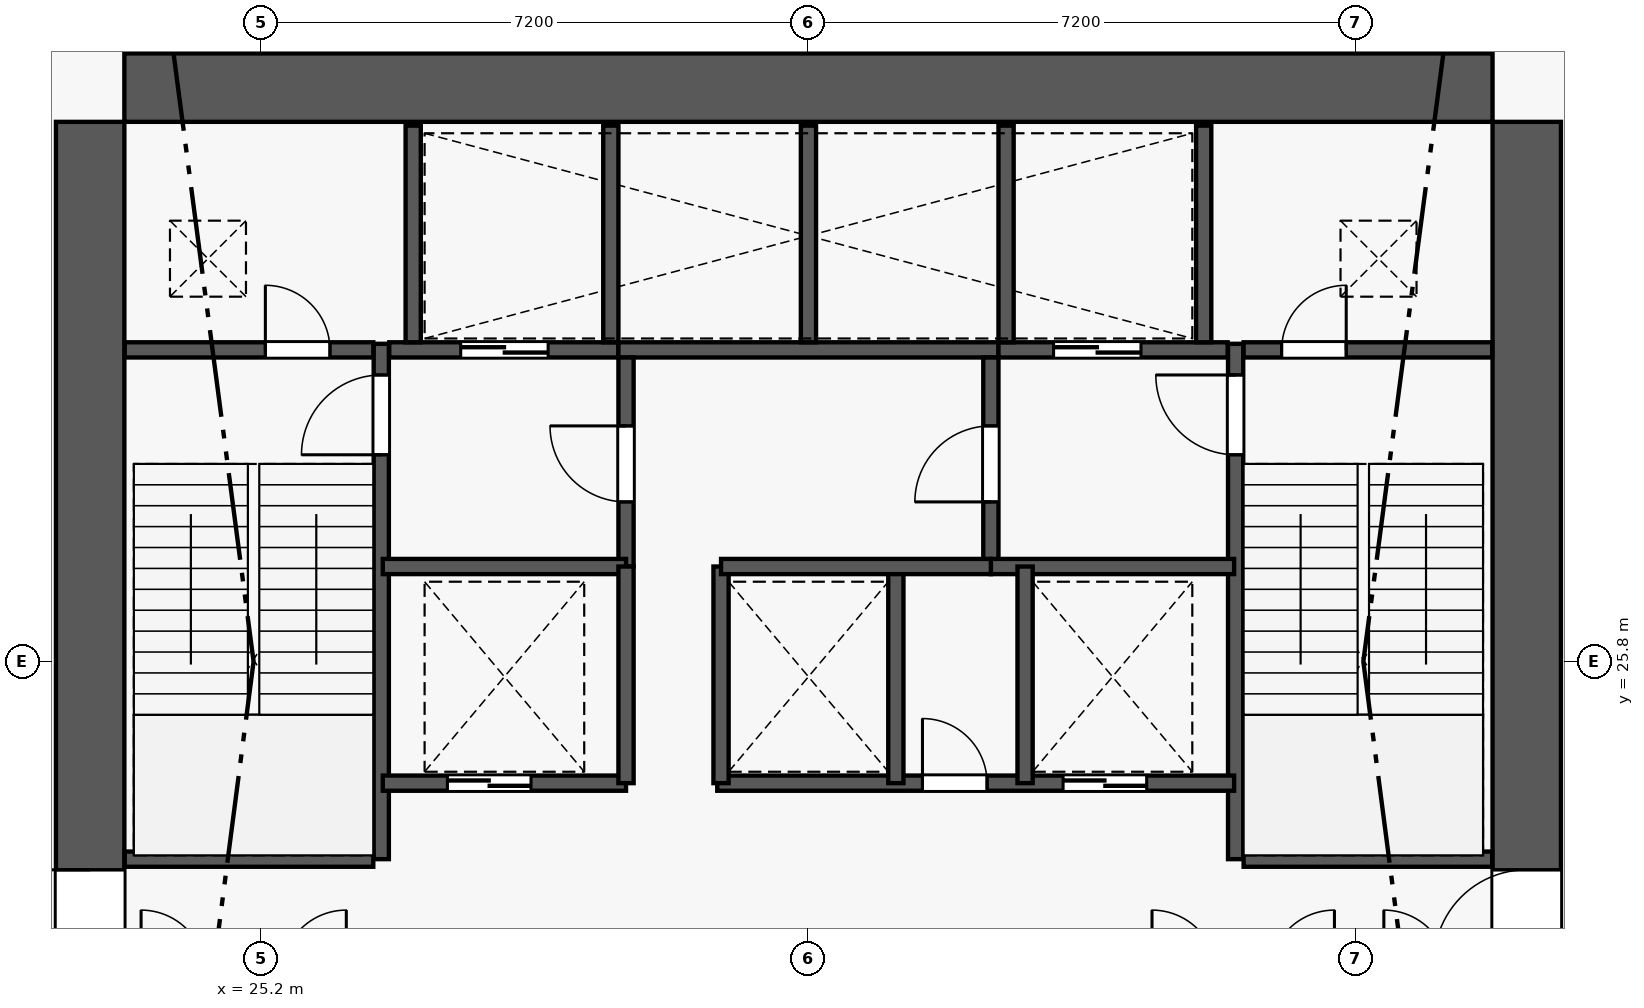
"""IFC4 building model, lengths in metres.
Left out: names, types, materials, properties, quantities, classifications, styles, units other than length and angle.
Written with IfcOpenShell. Run it as: python <this file> out.ifc"""

import sys

from ifc_helpers import new_model, si_unit, direction, frame, frame_2d, origin, origin_2d, place, context, subcontext, project, spatial, rectangle, extrude, element, fill, save


model = new_model("IFC4")
c1 = context("Model", 3, precision=1e-05, world=origin(), true_north=direction((0.0, 1.0)))
c2 = subcontext(c1, "Body", "Model", "MODEL_VIEW")
j1 = project(units=[si_unit("LENGTHUNIT", "METRE"), si_unit("PLANEANGLEUNIT", "RADIAN")], contexts=[c1])
p1 = place(None, origin())
s1 = spatial("IfcSite", under=j1, at=p1, CompositionType="ELEMENT")
p2 = place(p1, origin())
s2 = spatial("IfcBuilding", under=s1, at=p2, CompositionType="ELEMENT")
p3 = place(p2, frame((0.0, 0.0, 10.5)))
s3 = spatial("IfcBuildingStorey", under=s2, at=p3, CompositionType="ELEMENT", Elevation=10.5)
for number, where, z_axis, x_axis in (
    (1, (41.85, 33.35, 0.0), (0.0, 0.0, 1.0), (1.0, 0.0, 0.0)),
    (2, (22.95, 33.35, 0.0), (0.0, 0.0, 1.0), (1.0, 0.0, 0.0)),
):
    element("IfcColumn", number, at=place(p3, frame(where, z_axis=z_axis, x_axis=x_axis)), inside=s3, PredefinedType="COLUMN", context=c2, shape_type="SweptSolid", body=[
        extrude(rectangle(XDim=0.9, YDim=0.9, at=origin_2d()), origin(), (0.0, 0.0, 1.0), 4.5),
    ])
p4 = place(p3, frame((23.4, 33.35, 0.0), z_axis=(0.0, 0.0, 1.0), x_axis=(1.0, 0.0, 0.0)))
e3 = element("IfcWall", 3, at=p4, inside=s3, PredefinedType="SHEAR", context=c2, shape_type="SweptSolid", body=[
    extrude(rectangle(XDim=18.0, YDim=0.9, at=frame_2d((9.0, 0.0))), origin(), (0.0, 0.0, 1.0), 4.25),
])
p5 = place(p3, frame((22.95, 18.9, 0.0), z_axis=(0.0, 0.0, 1.0), x_axis=(0.0, 1.0, 0.0)))
e4 = element("IfcWall", 4, at=p5, inside=s3, PredefinedType="SHEAR", context=c2, shape_type="SweptSolid", body=[
    extrude(rectangle(XDim=14.0, YDim=0.9, at=frame_2d((7.0, 0.0))), origin(), (0.0, 0.0, 1.0), 4.25),
])
p6 = place(p5, frame((2.94, 0.0, 0.0)))
e5 = element("IfcOpeningElement", 5, at=p6, cuts=e4, PredefinedType="OPENING", context=c2, shape_type="SweptSolid", body=[
    extrude(rectangle(XDim=1.22, YDim=2.25, at=frame_2d((0.61, 1.125))), frame((0.0, 0.46, 0.0), z_axis=(0.0, -1.0, 0.0), x_axis=(1.0, 0.0, 0.0)), (0.0, 0.0, 1.0), 0.92),
])
p7 = place(p3, frame((41.85, 18.9, 0.0), z_axis=(0.0, 0.0, 1.0), x_axis=(0.0, 1.0, 0.0)))
e6 = element("IfcWall", 6, at=p7, inside=s3, PredefinedType="SHEAR", context=c2, shape_type="SweptSolid", body=[
    extrude(rectangle(XDim=14.0, YDim=0.9, at=frame_2d((7.0, 0.0))), origin(), (0.0, 0.0, 1.0), 4.25),
])
p8 = place(p7, frame((2.94, 0.0, 0.0)))
e7 = element("IfcOpeningElement", 7, at=p8, cuts=e6, PredefinedType="OPENING", context=c2, shape_type="SweptSolid", body=[
    extrude(rectangle(XDim=1.22, YDim=2.25, at=frame_2d((0.61, 1.125))), frame((0.0, 0.46, 0.0), z_axis=(0.0, -1.0, 0.0), x_axis=(1.0, 0.0, 0.0)), (0.0, 0.0, 1.0), 0.92),
])
p9 = place(p3, frame((26.78, 23.2, 0.0), z_axis=(0.0, 0.0, 1.0), x_axis=(0.0, 1.0, 0.0)))
e8 = element("IfcWall", 8, at=p9, inside=s3, PredefinedType="SHEAR", context=c2, shape_type="SweptSolid", body=[
    extrude(rectangle(XDim=6.78, YDim=0.2, at=frame_2d((3.39, 0.0))), origin(), (0.0, 0.0, 1.0), 4.5),
])
p10 = place(p9, frame((5.32, 0.0, 0.0)))
e9 = element("IfcOpeningElement", 9, at=p10, cuts=e8, PredefinedType="OPENING", context=c2, shape_type="SweptSolid", body=[
    extrude(rectangle(XDim=1.05, YDim=2.15, at=frame_2d((0.525, 1.075))), frame((0.0, 0.11, 0.0), z_axis=(0.0, -1.0, 0.0), x_axis=(1.0, 0.0, 0.0)), (0.0, 0.0, 1.0), 0.22),
])
p11 = place(p3, frame((23.405, 23.2, 0.0), z_axis=(0.0, 0.0, 1.0), x_axis=(1.0, 0.0, 0.0)))
e10 = element("IfcWall", 10, at=p11, inside=s3, PredefinedType="PLUMBINGWALL", context=c2, shape_type="SweptSolid", body=[
    extrude(rectangle(XDim=3.27, YDim=0.2, at=frame_2d((1.635, 0.0))), origin(), (0.0, 0.0, 1.0), 4.25),
])
p12 = place(p3, frame((38.02, 23.2, 0.0), z_axis=(0.0, 0.0, 1.0), x_axis=(0.0, 1.0, 0.0)))
e11 = element("IfcWall", 11, at=p12, inside=s3, PredefinedType="SHEAR", context=c2, shape_type="SweptSolid", body=[
    extrude(rectangle(XDim=6.78, YDim=0.2, at=frame_2d((3.39, 0.0))), origin(), (0.0, 0.0, 1.0), 4.5),
])
p13 = place(p12, frame((5.32, 0.0, 0.0)))
e12 = element("IfcOpeningElement", 12, at=p13, cuts=e11, PredefinedType="OPENING", context=c2, shape_type="SweptSolid", body=[
    extrude(rectangle(XDim=1.05, YDim=2.15, at=frame_2d((0.525, 1.075))), frame((0.0, 0.11, 0.0), z_axis=(0.0, -1.0, 0.0), x_axis=(1.0, 0.0, 0.0)), (0.0, 0.0, 1.0), 0.22),
])
p14 = place(p3, frame((38.125, 23.2, 0.0), z_axis=(0.0, 0.0, 1.0), x_axis=(1.0, 0.0, 0.0)))
e13 = element("IfcWall", 13, at=p14, inside=s3, PredefinedType="PLUMBINGWALL", context=c2, shape_type="SweptSolid", body=[
    extrude(rectangle(XDim=3.27, YDim=0.2, at=frame_2d((1.635, 0.0))), origin(), (0.0, 0.0, 1.0), 4.25),
])
p15 = place(p3, frame((23.405, 29.9, 0.0), z_axis=(0.0, 0.0, 1.0), x_axis=(1.0, 0.0, 0.0)))
e14 = element("IfcWall", 14, at=p15, inside=s3, PredefinedType="PLUMBINGWALL", context=c2, shape_type="SweptSolid", body=[
    extrude(rectangle(XDim=3.27, YDim=0.2, at=frame_2d((1.635, 0.0))), origin(), (0.0, 0.0, 1.0), 4.25),
])
p16 = place(p15, frame((1.85, 0.0, 0.0)))
e15 = element("IfcOpeningElement", 15, at=p16, cuts=e14, PredefinedType="OPENING", context=c2, shape_type="SweptSolid", body=[
    extrude(rectangle(XDim=0.85, YDim=2.05, at=frame_2d((0.425, 1.025))), frame((0.0, 0.11, 0.0), z_axis=(0.0, -1.0, 0.0), x_axis=(1.0, 0.0, 0.0)), (0.0, 0.0, 1.0), 0.22),
])
p17 = place(p3, frame((26.885, 29.9, 0.0), z_axis=(0.0, 0.0, 1.0), x_axis=(1.0, 0.0, 0.0)))
e16 = element("IfcWall", 16, at=p17, inside=s3, PredefinedType="PLUMBINGWALL", context=c2, shape_type="SweptSolid", body=[
    extrude(rectangle(XDim=3.015, YDim=0.2, at=frame_2d((1.507, 0.0))), origin(), (0.0, 0.0, 1.0), 4.25),
])
p18 = place(p17, frame((0.94, 0.0, 0.0)))
e17 = element("IfcOpeningElement", 17, at=p18, cuts=e16, PredefinedType="OPENING", context=c2, shape_type="SweptSolid", body=[
    extrude(rectangle(XDim=1.15, YDim=2.2, at=frame_2d((0.575, 1.1))), frame((0.0, 0.11, 0.0), z_axis=(0.0, -1.0, 0.0), x_axis=(1.0, 0.0, 0.0)), (0.0, 0.0, 1.0), 0.22),
])
p19 = place(p3, frame((29.9, 29.9, 0.0), z_axis=(0.0, 0.0, 1.0), x_axis=(1.0, 0.0, 0.0)))
e18 = element("IfcWall", 18, at=p19, inside=s3, PredefinedType="PLUMBINGWALL", context=c2, shape_type="SweptSolid", body=[
    extrude(rectangle(XDim=5.0, YDim=0.2, at=frame_2d((2.5, 0.0))), origin(), (0.0, 0.0, 1.0), 4.25),
])
p20 = place(p3, frame((34.9, 29.9, 0.0), z_axis=(0.0, 0.0, 1.0), x_axis=(1.0, 0.0, 0.0)))
e19 = element("IfcWall", 19, at=p20, inside=s3, PredefinedType="PLUMBINGWALL", context=c2, shape_type="SweptSolid", body=[
    extrude(rectangle(XDim=3.015, YDim=0.2, at=frame_2d((1.508, 0.0))), origin(), (0.0, 0.0, 1.0), 4.25),
])
p21 = place(p20, frame((0.725, 0.0, 0.0)))
e20 = element("IfcOpeningElement", 20, at=p21, cuts=e19, PredefinedType="OPENING", context=c2, shape_type="SweptSolid", body=[
    extrude(rectangle(XDim=1.15, YDim=2.2, at=frame_2d((0.575, 1.1))), frame((0.0, 0.11, 0.0), z_axis=(0.0, -1.0, 0.0), x_axis=(1.0, 0.0, 0.0)), (0.0, 0.0, 1.0), 0.22),
])
p22 = place(p3, frame((38.125, 29.9, 0.0), z_axis=(0.0, 0.0, 1.0), x_axis=(1.0, 0.0, 0.0)))
e21 = element("IfcWall", 21, at=p22, inside=s3, PredefinedType="PLUMBINGWALL", context=c2, shape_type="SweptSolid", body=[
    extrude(rectangle(XDim=3.27, YDim=0.2, at=frame_2d((1.635, 0.0))), origin(), (0.0, 0.0, 1.0), 4.25),
])
p23 = place(p22, frame((0.5, 0.0, 0.0)))
e22 = element("IfcOpeningElement", 22, at=p23, cuts=e21, PredefinedType="OPENING", context=c2, shape_type="SweptSolid", body=[
    extrude(rectangle(XDim=0.85, YDim=2.05, at=frame_2d((0.425, 1.025))), frame((0.0, 0.11, 0.0), z_axis=(0.0, -1.0, 0.0), x_axis=(1.0, 0.0, 0.0)), (0.0, 0.0, 1.0), 0.22),
])
for number, where, z_axis, x_axis in (
    (23, (27.2, 30.0, 0.0), (0.0, 0.0, 1.0), (0.0, 1.0, 0.0)),
    (24, (29.8, 30.0, 0.0), (0.0, 0.0, 1.0), (0.0, 1.0, 0.0)),
    (25, (32.4, 30.0, 0.0), (0.0, 0.0, 1.0), (0.0, 1.0, 0.0)),
    (26, (35.0, 30.0, 0.0), (0.0, 0.0, 1.0), (0.0, 1.0, 0.0)),
    (27, (37.6, 30.0, 0.0), (0.0, 0.0, 1.0), (0.0, 1.0, 0.0)),
):
    element("IfcWall", number, at=place(p3, frame(where, z_axis=z_axis, x_axis=x_axis)), inside=s3, PredefinedType="PLUMBINGWALL", context=c2, shape_type="SweptSolid", body=[
        extrude(rectangle(XDim=2.85, YDim=0.2, at=frame_2d((1.425, 0.0))), origin(), (0.0, 0.0, 1.0), 4.25),
    ])
p24 = place(p3, frame((30.0, 27.05, 0.0), z_axis=(0.0, 0.0, 1.0), x_axis=(0.0, 1.0, 0.0)))
e28 = element("IfcWall", 28, at=p24, inside=s3, PredefinedType="PLUMBINGWALL", context=c2, shape_type="SweptSolid", body=[
    extrude(rectangle(XDim=2.75, YDim=0.2, at=frame_2d((1.375, 0.0))), origin(), (0.0, 0.0, 1.0), 4.25),
])
p25 = place(p24, frame((0.85, 0.0, 0.0)))
e29 = element("IfcOpeningElement", 29, at=p25, cuts=e28, PredefinedType="OPENING", context=c2, shape_type="SweptSolid", body=[
    extrude(rectangle(XDim=1.0, YDim=2.15, at=frame_2d((0.5, 1.075))), frame((0.0, 0.11, 0.0), z_axis=(0.0, -1.0, 0.0), x_axis=(1.0, 0.0, 0.0)), (0.0, 0.0, 1.0), 0.22),
])
p26 = place(p3, frame((26.8, 27.05, 0.0), z_axis=(0.0, 0.0, 1.0), x_axis=(1.0, 0.0, 0.0)))
e30 = element("IfcWall", 30, at=p26, inside=s3, PredefinedType="PLUMBINGWALL", context=c2, shape_type="SweptSolid", body=[
    extrude(rectangle(XDim=3.2, YDim=0.2, at=frame_2d((1.6, 0.0))), origin(), (0.0, 0.0, 1.0), 4.25),
])
p27 = place(p3, frame((34.8, 27.05, 0.0), z_axis=(0.0, 0.0, 1.0), x_axis=(0.0, 1.0, 0.0)))
e31 = element("IfcWall", 31, at=p27, inside=s3, PredefinedType="PLUMBINGWALL", context=c2, shape_type="SweptSolid", body=[
    extrude(rectangle(XDim=2.75, YDim=0.2, at=frame_2d((1.375, 0.0))), origin(), (0.0, 0.0, 1.0), 4.25),
])
p28 = place(p27, frame((0.85, 0.0, 0.0)))
e32 = element("IfcOpeningElement", 32, at=p28, cuts=e31, PredefinedType="OPENING", context=c2, shape_type="SweptSolid", body=[
    extrude(rectangle(XDim=1.0, YDim=2.15, at=frame_2d((0.5, 1.075))), frame((0.0, 0.11, 0.0), z_axis=(0.0, -1.0, 0.0), x_axis=(1.0, 0.0, 0.0)), (0.0, 0.0, 1.0), 0.22),
])
p29 = place(p3, frame((34.8, 27.05, 0.0), z_axis=(0.0, 0.0, 1.0), x_axis=(1.0, 0.0, 0.0)))
e33 = element("IfcWall", 33, at=p29, inside=s3, PredefinedType="PLUMBINGWALL", context=c2, shape_type="SweptSolid", body=[
    extrude(rectangle(XDim=3.2, YDim=0.2, at=frame_2d((1.6, 0.0))), origin(), (0.0, 0.0, 1.0), 4.25),
])
p30 = place(p3, frame((26.8, 24.2, 0.0), z_axis=(0.0, 0.0, 1.0), x_axis=(1.0, 0.0, 0.0)))
e34 = element("IfcWall", 34, at=p30, inside=s3, PredefinedType="PLUMBINGWALL", context=c2, shape_type="SweptSolid", body=[
    extrude(rectangle(XDim=3.2, YDim=0.2, at=frame_2d((1.6, 0.0))), origin(), (0.0, 0.0, 1.0), 4.25),
])
p31 = place(p30, frame((0.85, 0.0, 0.0)))
e35 = element("IfcOpeningElement", 35, at=p31, cuts=e34, PredefinedType="OPENING", context=c2, shape_type="SweptSolid", body=[
    extrude(rectangle(XDim=1.1, YDim=2.2, at=frame_2d((0.55, 1.1))), frame((0.0, 0.11, 0.0), z_axis=(0.0, -1.0, 0.0), x_axis=(1.0, 0.0, 0.0)), (0.0, 0.0, 1.0), 0.22),
])
p32 = place(p3, frame((30.0, 24.2, 0.0), z_axis=(0.0, 0.0, 1.0), x_axis=(0.0, 1.0, 0.0)))
e36 = element("IfcWall", 36, at=p32, inside=s3, PredefinedType="PLUMBINGWALL", context=c2, shape_type="SweptSolid", body=[
    extrude(rectangle(XDim=2.85, YDim=0.2, at=frame_2d((1.425, 0.0))), origin(), (0.0, 0.0, 1.0), 4.25),
])
p33 = place(p3, frame((31.2, 24.2, 0.0), z_axis=(0.0, 0.0, 1.0), x_axis=(1.0, 0.0, 0.0)))
e37 = element("IfcWall", 37, at=p33, inside=s3, PredefinedType="PLUMBINGWALL", context=c2, shape_type="SweptSolid", body=[
    extrude(rectangle(XDim=6.8, YDim=0.2, at=frame_2d((3.4, 0.0))), origin(), (0.0, 0.0, 1.0), 4.25),
])
p34 = place(p33, frame((2.7, 0.0, 0.0)))
e38 = element("IfcOpeningElement", 38, at=p34, cuts=e37, PredefinedType="OPENING", context=c2, shape_type="SweptSolid", body=[
    extrude(rectangle(XDim=0.85, YDim=2.05, at=frame_2d((0.425, 1.025))), frame((0.0, 0.11, 0.0), z_axis=(0.0, -1.0, 0.0), x_axis=(1.0, 0.0, 0.0)), (0.0, 0.0, 1.0), 0.22),
])
p35 = place(p33, frame((4.55, 0.0, 0.0)))
e39 = element("IfcOpeningElement", 39, at=p35, cuts=e37, PredefinedType="OPENING", context=c2, shape_type="SweptSolid", body=[
    extrude(rectangle(XDim=1.1, YDim=2.2, at=frame_2d((0.55, 1.1))), frame((0.0, 0.11, 0.0), z_axis=(0.0, -1.0, 0.0), x_axis=(1.0, 0.0, 0.0)), (0.0, 0.0, 1.0), 0.22),
])
for number, where, z_axis, x_axis in (
    (40, (31.25, 24.2, 0.0), (0.0, 0.0, 1.0), (0.0, 1.0, 0.0)),
    (41, (33.55, 24.2, 0.0), (0.0, 0.0, 1.0), (0.0, 1.0, 0.0)),
    (42, (35.25, 24.2, 0.0), (0.0, 0.0, 1.0), (0.0, 1.0, 0.0)),
):
    element("IfcWall", number, at=place(p3, frame(where, z_axis=z_axis, x_axis=x_axis)), inside=s3, PredefinedType="PLUMBINGWALL", context=c2, shape_type="SweptSolid", body=[
        extrude(rectangle(XDim=2.85, YDim=0.2, at=frame_2d((1.425, 0.0))), origin(), (0.0, 0.0, 1.0), 4.25),
    ])
p36 = place(p3, frame((31.25, 27.05, 0.0), z_axis=(0.0, 0.0, 1.0), x_axis=(1.0, 0.0, 0.0)))
e43 = element("IfcWall", 43, at=p36, inside=s3, PredefinedType="PLUMBINGWALL", context=c2, shape_type="SweptSolid", body=[
    extrude(rectangle(XDim=3.55, YDim=0.2, at=frame_2d((1.775, 0.0))), origin(), (0.0, 0.0, 1.0), 4.25),
])
p37 = place(p6, origin())
e44 = element("IfcDoor", 44, at=p37, inside=s3, OperationType="SINGLE_SWING_RIGHT", PredefinedType="DOOR", context=c2, shape_type="SweptSolid", body=[
    extrude(rectangle(XDim=1.22, YDim=2.25, at=frame_2d((0.61, 1.125))), frame((0.0, 0.025, 0.0), z_axis=(0.0, -1.0, 0.0), x_axis=(1.0, 0.0, 0.0)), (0.0, 0.0, 1.0), 0.05),
])
fill(e5, e44)
p38 = place(p8, origin())
e45 = element("IfcDoor", 45, at=p38, inside=s3, OperationType="SINGLE_SWING_LEFT", PredefinedType="DOOR", context=c2, shape_type="SweptSolid", body=[
    extrude(rectangle(XDim=1.22, YDim=2.25, at=frame_2d((0.61, 1.125))), frame((0.0, 0.025, 0.0), z_axis=(0.0, -1.0, 0.0), x_axis=(1.0, 0.0, 0.0)), (0.0, 0.0, 1.0), 0.05),
])
fill(e7, e45)
p39 = place(p10, origin())
e46 = element("IfcDoor", 46, at=p39, inside=s3, OperationType="SINGLE_SWING_LEFT", PredefinedType="DOOR", context=c2, shape_type="SweptSolid", body=[
    extrude(rectangle(XDim=1.05, YDim=2.15, at=frame_2d((0.525, 1.075))), frame((0.0, 0.025, 0.0), z_axis=(0.0, -1.0, 0.0), x_axis=(1.0, 0.0, 0.0)), (0.0, 0.0, 1.0), 0.05),
])
fill(e9, e46)
p40 = place(p13, origin())
e47 = element("IfcDoor", 47, at=p40, inside=s3, OperationType="SINGLE_SWING_RIGHT", PredefinedType="DOOR", context=c2, shape_type="SweptSolid", body=[
    extrude(rectangle(XDim=1.05, YDim=2.15, at=frame_2d((0.525, 1.075))), frame((0.0, 0.025, 0.0), z_axis=(0.0, -1.0, 0.0), x_axis=(1.0, 0.0, 0.0)), (0.0, 0.0, 1.0), 0.05),
])
fill(e12, e47)
p41 = place(p16, origin())
e48 = element("IfcDoor", 48, at=p41, inside=s3, OperationType="SINGLE_SWING_LEFT", PredefinedType="DOOR", context=c2, shape_type="SweptSolid", body=[
    extrude(rectangle(XDim=0.85, YDim=2.05, at=frame_2d((0.425, 1.025))), frame((0.0, 0.025, 0.0), z_axis=(0.0, -1.0, 0.0), x_axis=(1.0, 0.0, 0.0)), (0.0, 0.0, 1.0), 0.05),
])
fill(e15, e48)
p42 = place(p23, origin())
e49 = element("IfcDoor", 49, at=p42, inside=s3, OperationType="SINGLE_SWING_RIGHT", PredefinedType="DOOR", context=c2, shape_type="SweptSolid", body=[
    extrude(rectangle(XDim=0.85, YDim=2.05, at=frame_2d((0.425, 1.025))), frame((0.0, 0.025, 0.0), z_axis=(0.0, -1.0, 0.0), x_axis=(1.0, 0.0, 0.0)), (0.0, 0.0, 1.0), 0.05),
])
fill(e22, e49)
p43 = place(p18, origin())
e50 = element("IfcDoor", 50, at=p43, inside=s3, OperationType="DOUBLE_DOOR_SLIDING", PredefinedType="DOOR", context=c2, shape_type="SweptSolid", body=[
    extrude(rectangle(XDim=1.15, YDim=2.2, at=frame_2d((0.575, 1.1))), frame((0.0, 0.025, 0.0), z_axis=(0.0, -1.0, 0.0), x_axis=(1.0, 0.0, 0.0)), (0.0, 0.0, 1.0), 0.05),
])
fill(e17, e50)
p44 = place(p21, origin())
e51 = element("IfcDoor", 51, at=p44, inside=s3, OperationType="DOUBLE_DOOR_SLIDING", PredefinedType="DOOR", context=c2, shape_type="SweptSolid", body=[
    extrude(rectangle(XDim=1.15, YDim=2.2, at=frame_2d((0.575, 1.1))), frame((0.0, 0.025, 0.0), z_axis=(0.0, -1.0, 0.0), x_axis=(1.0, 0.0, 0.0)), (0.0, 0.0, 1.0), 0.05),
])
fill(e20, e51)
p45 = place(p25, origin())
e52 = element("IfcDoor", 52, at=p45, inside=s3, OperationType="SINGLE_SWING_RIGHT", PredefinedType="DOOR", context=c2, shape_type="SweptSolid", body=[
    extrude(rectangle(XDim=1.0, YDim=2.15, at=frame_2d((0.5, 1.075))), frame((0.0, 0.025, 0.0), z_axis=(0.0, -1.0, 0.0), x_axis=(1.0, 0.0, 0.0)), (0.0, 0.0, 1.0), 0.05),
])
fill(e29, e52)
p46 = place(p28, origin())
e53 = element("IfcDoor", 53, at=p46, inside=s3, OperationType="SINGLE_SWING_LEFT", PredefinedType="DOOR", context=c2, shape_type="SweptSolid", body=[
    extrude(rectangle(XDim=1.0, YDim=2.15, at=frame_2d((0.5, 1.075))), frame((0.0, 0.025, 0.0), z_axis=(0.0, -1.0, 0.0), x_axis=(1.0, 0.0, 0.0)), (0.0, 0.0, 1.0), 0.05),
])
fill(e32, e53)
p47 = place(p31, origin())
e54 = element("IfcDoor", 54, at=p47, inside=s3, OperationType="DOUBLE_DOOR_SLIDING", PredefinedType="DOOR", context=c2, shape_type="SweptSolid", body=[
    extrude(rectangle(XDim=1.1, YDim=2.2, at=frame_2d((0.55, 1.1))), frame((0.0, 0.025, 0.0), z_axis=(0.0, -1.0, 0.0), x_axis=(1.0, 0.0, 0.0)), (0.0, 0.0, 1.0), 0.05),
])
fill(e35, e54)
p48 = place(p34, origin())
e55 = element("IfcDoor", 55, at=p48, inside=s3, OperationType="SINGLE_SWING_LEFT", PredefinedType="DOOR", context=c2, shape_type="SweptSolid", body=[
    extrude(rectangle(XDim=0.85, YDim=2.05, at=frame_2d((0.425, 1.025))), frame((0.0, 0.025, 0.0), z_axis=(0.0, -1.0, 0.0), x_axis=(1.0, 0.0, 0.0)), (0.0, 0.0, 1.0), 0.05),
])
fill(e38, e55)
p49 = place(p35, origin())
e56 = element("IfcDoor", 56, at=p49, inside=s3, OperationType="DOUBLE_DOOR_SLIDING", PredefinedType="DOOR", context=c2, shape_type="SweptSolid", body=[
    extrude(rectangle(XDim=1.1, YDim=2.2, at=frame_2d((0.55, 1.1))), frame((0.0, 0.025, 0.0), z_axis=(0.0, -1.0, 0.0), x_axis=(1.0, 0.0, 0.0)), (0.0, 0.0, 1.0), 0.05),
])
fill(e39, e56)
save(model, sys.argv[1])
